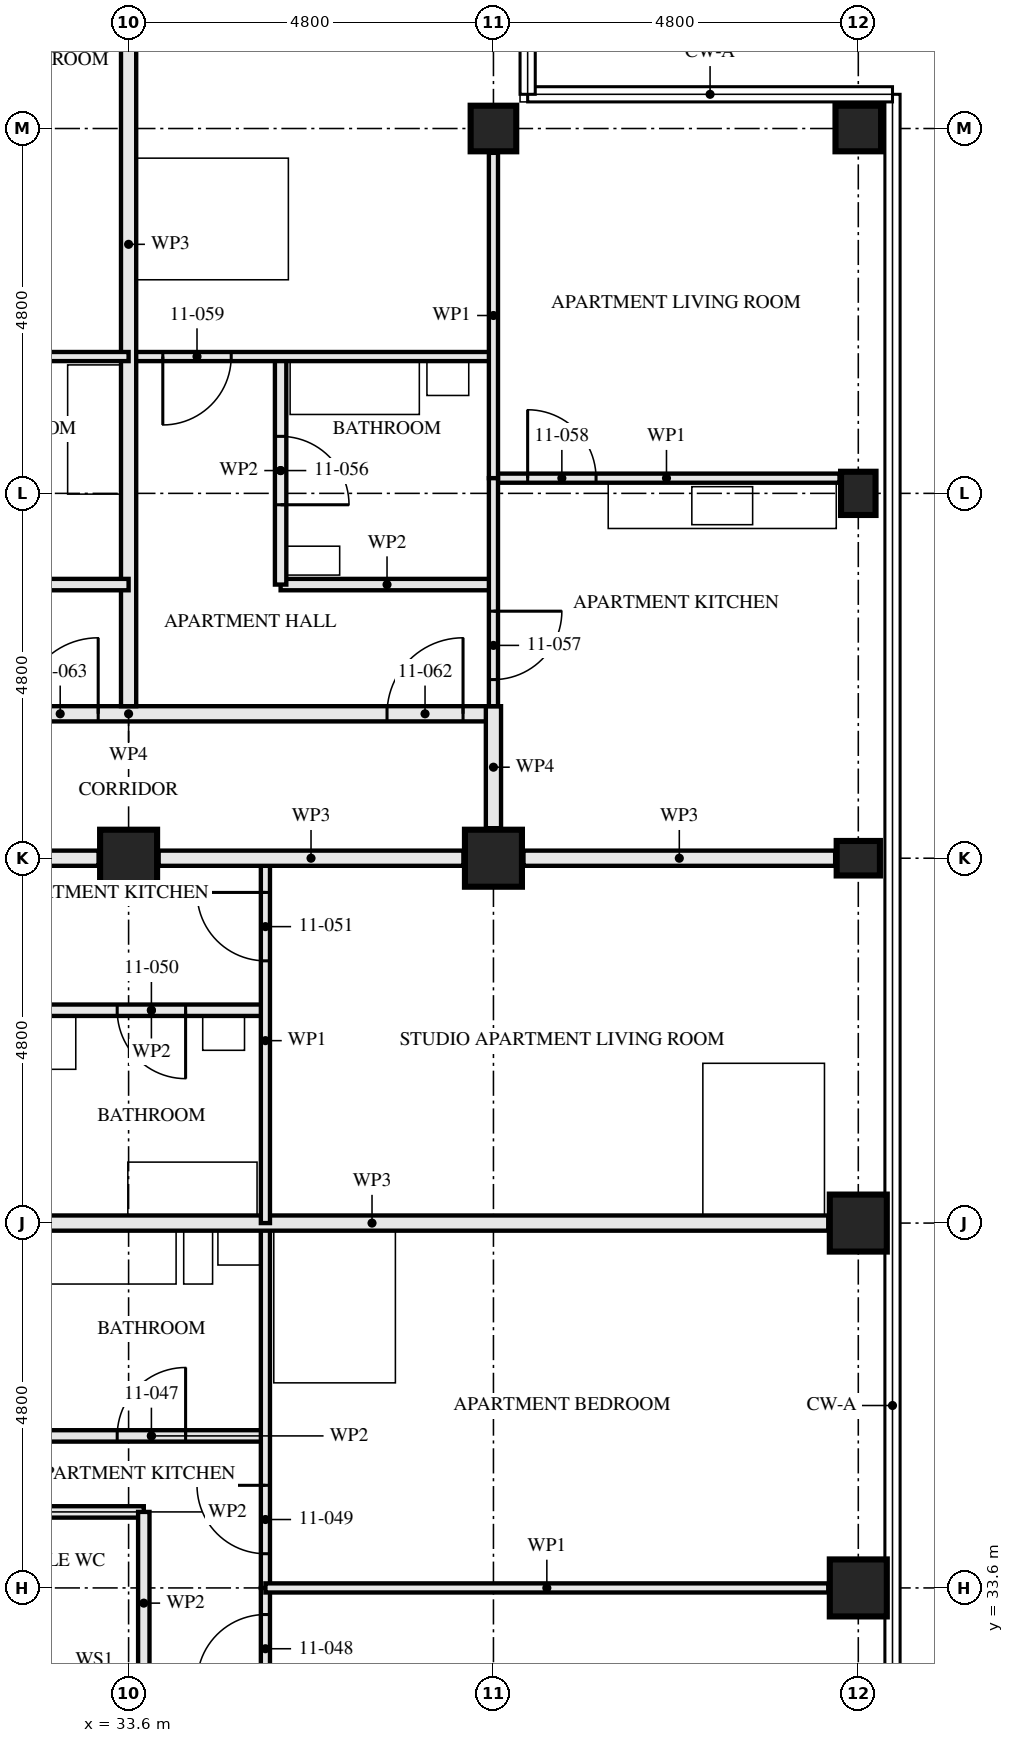
"""IFC4 building model, lengths in metres.
Left out: names, types, materials, properties, quantities, classifications, styles, units other than length and angle.
Written with IfcOpenShell. Run it as: python <this file> out.ifc"""

import sys

from ifc_helpers import new_model, si_unit, direction, frame, frame_2d, origin, origin_2d, place, context, subcontext, project, spatial, rectangle, hollow_rectangle, i_section, extrude, element, fill, save


model = new_model("IFC4")
c1 = context("Model", 3, precision=1e-05, world=origin(), true_north=direction((0.0, 1.0)))
c2 = subcontext(c1, "Body", "Model", "MODEL_VIEW")
j1 = project(units=[si_unit("LENGTHUNIT", "METRE"), si_unit("PLANEANGLEUNIT", "RADIAN")], contexts=[c1])
p1 = place(None, origin())
s1 = spatial("IfcSite", under=j1, at=p1, CompositionType="ELEMENT")
p2 = place(p1, origin())
s2 = spatial("IfcBuilding", under=s1, at=p2, CompositionType="ELEMENT")
p3 = place(p2, frame((0.0, 0.0, 44.5)))
s3 = spatial("IfcBuildingStorey", under=s2, at=p3, CompositionType="ELEMENT", Elevation=44.5)
for number, where, z_axis, x_axis in (
    (1, (33.6, 43.2, 0.0), (0.0, 0.0, 1.0), (0.0, 1.0, 0.0)),
    (2, (38.4, 43.2, 0.0), (0.0, 0.0, 1.0), (0.0, 1.0, 0.0)),
):
    element("IfcColumn", number, at=place(p3, frame(where, z_axis=z_axis, x_axis=x_axis)), inside=s3, PredefinedType="COLUMN", context=c2, shape_type="SweptSolid", body=[
        extrude(hollow_rectangle(XDim=0.75, YDim=0.75, WallThickness=0.08, at=origin_2d()), origin(), (0.0, 0.0, 1.0), 3.5),
    ])
p4 = place(p3, frame((38.4, 52.8, 0.0), z_axis=(0.0, 0.0, 1.0), x_axis=(0.0, 1.0, 0.0)))
e3 = element("IfcColumn", 3, at=p4, inside=s3, PredefinedType="COLUMN", context=c2, shape_type="SweptSolid", body=[
    extrude(hollow_rectangle(XDim=0.6, YDim=0.6, WallThickness=0.05, at=origin_2d()), origin(), (0.0, 0.0, 1.0), 3.5),
])
for number, where, z_axis, x_axis in (
    (4, (43.2, 33.6, 0.0), (0.0, 0.0, 1.0), (1.0, 0.0, 0.0)),
    (5, (43.2, 38.4, 0.0), (0.0, 0.0, 1.0), (1.0, 0.0, 0.0)),
):
    element("IfcColumn", number, at=place(p3, frame(where, z_axis=z_axis, x_axis=x_axis)), inside=s3, PredefinedType="COLUMN", context=c2, shape_type="SweptSolid", body=[
        extrude(hollow_rectangle(XDim=0.75, YDim=0.75, WallThickness=0.08, at=origin_2d()), origin(), (0.0, 0.0, 1.0), 3.5),
    ])
for number, where, z_axis, x_axis in (
    (6, (43.2, 43.2, 0.0), (0.0, 0.0, 1.0), (0.0, 1.0, 0.0)),
    (7, (43.2, 48.0, 0.0), (0.0, 0.0, 1.0), (1.0, 0.0, 0.0)),
):
    element("IfcColumn", number, at=place(p3, frame(where, z_axis=z_axis, x_axis=x_axis)), inside=s3, PredefinedType="COLUMN", context=c2, shape_type="SweptSolid", body=[
        extrude(i_section(OverallWidth=0.454, OverallDepth=0.569, WebThickness=0.078, FlangeThickness=0.125, FilletRadius=0.015, at=origin_2d()), origin(), (0.0, 0.0, 1.0), 3.5),
    ])
p5 = place(p3, frame((43.2, 52.8, 0.0), z_axis=(0.0, 0.0, 1.0), x_axis=(0.0, 1.0, 0.0)))
e8 = element("IfcColumn", 8, at=p5, inside=s3, PredefinedType="COLUMN", context=c2, shape_type="SweptSolid", body=[
    extrude(hollow_rectangle(XDim=0.6, YDim=0.6, WallThickness=0.05, at=origin_2d()), origin(), (0.0, 0.0, 1.0), 3.5),
])
p6 = place(p3, frame((33.8, 32.2, 0.0), z_axis=(0.0, 0.0, 1.0), x_axis=(0.0, 1.0, 0.0)))
e9 = element("IfcWall", 9, at=p6, inside=s3, PredefinedType="PARTITIONING", context=c2, shape_type="SweptSolid", body=[
    extrude(rectangle(XDim=2.4, YDim=0.15, at=frame_2d((1.2, 0.0))), origin(), (0.0, 0.0, 1.0), 2.55),
])
p7 = place(p3, frame((33.8, 34.6, 0.0), z_axis=(0.0, 0.0, 1.0), x_axis=(-1.0, 0.0, 0.0)))
e10 = element("IfcWall", 10, at=p7, inside=s3, PredefinedType="PARTITIONING", context=c2, shape_type="SweptSolid", body=[
    extrude(rectangle(XDim=3.0, YDim=0.15, at=frame_2d((1.5, 0.0))), origin(), (0.0, 0.0, 1.0), 3.33),
])
p8 = place(p3, frame((35.4, 35.6, 0.0), z_axis=(0.0, 0.0, 1.0), x_axis=(-1.0, 0.0, 0.0)))
e11 = element("IfcWall", 11, at=p8, inside=s3, PredefinedType="PARTITIONING", context=c2, shape_type="SweptSolid", body=[
    extrude(rectangle(XDim=3.0, YDim=0.15, at=frame_2d((1.5, 0.0))), origin(), (0.0, 0.0, 1.0), 3.33),
])
p9 = place(p8, frame((1.05, 0.0, 0.0)))
e12 = element("IfcOpeningElement", 12, at=p9, cuts=e11, PredefinedType="OPENING", context=c2, shape_type="SweptSolid", body=[
    extrude(rectangle(XDim=0.9, YDim=2.1, at=frame_2d((0.45, 1.05))), frame((0.0, 0.085, 0.0), z_axis=(0.0, -1.0, 0.0), x_axis=(1.0, 0.0, 0.0)), (0.0, 0.0, 1.0), 0.171),
])
p10 = place(p3, frame((35.4, 32.2, 0.0), z_axis=(0.0, 0.0, 1.0), x_axis=(0.0, 1.0, 0.0)))
e13 = element("IfcWall", 13, at=p10, inside=s3, PredefinedType="PARTITIONING", context=c2, shape_type="SweptSolid", body=[
    extrude(rectangle(XDim=1.4, YDim=0.12, at=frame_2d((0.7, 0.0))), origin(), (0.0, 0.0, 1.0), 3.33),
])
p11 = place(p10, frame((0.15, 0.0, 0.0)))
e14 = element("IfcOpeningElement", 14, at=p11, cuts=e13, PredefinedType="OPENING", context=c2, shape_type="SweptSolid", body=[
    extrude(rectangle(XDim=0.9, YDim=2.1, at=frame_2d((0.45, 1.05))), frame((0.0, 0.071, 0.0), z_axis=(0.0, -1.0, 0.0), x_axis=(1.0, 0.0, 0.0)), (0.0, 0.0, 1.0), 0.141),
])
p12 = place(p3, frame((35.4, 33.6, 0.0), z_axis=(0.0, 0.0, 1.0), x_axis=(0.0, 1.0, 0.0)))
e15 = element("IfcWall", 15, at=p12, inside=s3, PredefinedType="PARTITIONING", context=c2, shape_type="SweptSolid", body=[
    extrude(rectangle(XDim=4.8, YDim=0.12, at=frame_2d((2.4, 0.0))), origin(), (0.0, 0.0, 1.0), 3.33),
])
p13 = place(p12, frame((0.45, 0.0, 0.0)))
e16 = element("IfcOpeningElement", 16, at=p13, cuts=e15, PredefinedType="OPENING", context=c2, shape_type="SweptSolid", body=[
    extrude(rectangle(XDim=0.9, YDim=2.1, at=frame_2d((0.45, 1.05))), frame((0.0, 0.071, 0.0), z_axis=(0.0, -1.0, 0.0), x_axis=(1.0, 0.0, 0.0)), (0.0, 0.0, 1.0), 0.141),
])
p14 = place(p3, frame((42.805, 33.6, 0.0), z_axis=(0.0, 0.0, 1.0), x_axis=(-1.0, 0.0, 0.0)))
e17 = element("IfcWall", 17, at=p14, inside=s3, PredefinedType="PARTITIONING", context=c2, shape_type="SweptSolid", body=[
    extrude(rectangle(XDim=7.405, YDim=0.12, at=frame_2d((3.703, 0.0))), origin(), (0.0, 0.0, 1.0), 2.55),
])
p15 = place(p3, frame((42.805, 38.4, 0.0), z_axis=(0.0, 0.0, 1.0), x_axis=(-1.0, 0.0, 0.0)))
e18 = element("IfcWall", 18, at=p15, inside=s3, PredefinedType="PARTITIONING", context=c2, shape_type="SweptSolid", body=[
    extrude(rectangle(XDim=12.005, YDim=0.2, at=frame_2d((6.002, 0.0))), origin(), (0.0, 0.0, 1.0), 2.55),
])
p16 = place(p3, frame((35.4, 41.2, 0.0), z_axis=(0.0, 0.0, 1.0), x_axis=(-1.0, 0.0, 0.0)))
e19 = element("IfcWall", 19, at=p16, inside=s3, PredefinedType="PARTITIONING", context=c2, shape_type="SweptSolid", body=[
    extrude(rectangle(XDim=3.0, YDim=0.15, at=frame_2d((1.5, 0.0))), origin(), (0.0, 0.0, 1.0), 3.33),
])
p17 = place(p16, frame((1.05, 0.0, 0.0)))
e20 = element("IfcOpeningElement", 20, at=p17, cuts=e19, PredefinedType="OPENING", context=c2, shape_type="SweptSolid", body=[
    extrude(rectangle(XDim=0.9, YDim=2.1, at=frame_2d((0.45, 1.05))), frame((0.0, 0.085, 0.0), z_axis=(0.0, -1.0, 0.0), x_axis=(1.0, 0.0, 0.0)), (0.0, 0.0, 1.0), 0.171),
])
p18 = place(p3, frame((35.4, 38.4, 0.0), z_axis=(0.0, 0.0, 1.0), x_axis=(0.0, 1.0, 0.0)))
e21 = element("IfcWall", 21, at=p18, inside=s3, PredefinedType="PARTITIONING", context=c2, shape_type="SweptSolid", body=[
    extrude(rectangle(XDim=4.8, YDim=0.12, at=frame_2d((2.4, 0.0))), origin(), (0.0, 0.0, 1.0), 3.33),
])
p19 = place(p18, frame((3.45, 0.0, 0.0)))
e22 = element("IfcOpeningElement", 22, at=p19, cuts=e21, PredefinedType="OPENING", context=c2, shape_type="SweptSolid", body=[
    extrude(rectangle(XDim=0.9, YDim=2.1, at=frame_2d((0.45, 1.05))), frame((0.0, 0.071, 0.0), z_axis=(0.0, -1.0, 0.0), x_axis=(1.0, 0.0, 0.0)), (0.0, 0.0, 1.0), 0.141),
])
p20 = place(p3, frame((35.6, 49.8, 0.0), z_axis=(0.0, 0.0, 1.0), x_axis=(0.0, -1.0, 0.0)))
e23 = element("IfcWall", 23, at=p20, inside=s3, PredefinedType="PARTITIONING", context=c2, shape_type="SweptSolid", body=[
    extrude(rectangle(XDim=3.0, YDim=0.15, at=frame_2d((1.5, 0.0))), origin(), (0.0, 0.0, 1.0), 2.55),
])
p21 = place(p20, frame((1.05, 0.0, 0.0)))
e24 = element("IfcOpeningElement", 24, at=p21, cuts=e23, PredefinedType="OPENING", context=c2, shape_type="SweptSolid", body=[
    extrude(rectangle(XDim=0.9, YDim=2.1, at=frame_2d((0.45, 1.05))), frame((0.0, 0.085, 0.0), z_axis=(0.0, -1.0, 0.0), x_axis=(1.0, 0.0, 0.0)), (0.0, 0.0, 1.0), 0.171),
])
p22 = place(p3, frame((38.4, 46.8, 0.0), z_axis=(0.0, 0.0, 1.0), x_axis=(-1.0, 0.0, 0.0)))
e25 = element("IfcWall", 25, at=p22, inside=s3, PredefinedType="PARTITIONING", context=c2, shape_type="SweptSolid", body=[
    extrude(rectangle(XDim=2.8, YDim=0.15, at=frame_2d((1.4, 0.0))), origin(), (0.0, 0.0, 1.0), 3.33),
])
p23 = place(p3, frame((38.4, 48.2, 0.0), z_axis=(0.0, 0.0, 1.0), x_axis=(0.0, -1.0, 0.0)))
e26 = element("IfcWall", 26, at=p23, inside=s3, PredefinedType="PARTITIONING", context=c2, shape_type="SweptSolid", body=[
    extrude(rectangle(XDim=3.0, YDim=0.12, at=frame_2d((1.5, 0.0))), origin(), (0.0, 0.0, 1.0), 2.55),
])
p24 = place(p23, frame((1.75, 0.0, 0.0)))
e27 = element("IfcOpeningElement", 27, at=p24, cuts=e26, PredefinedType="OPENING", context=c2, shape_type="SweptSolid", body=[
    extrude(rectangle(XDim=0.9, YDim=2.1, at=frame_2d((0.45, 1.05))), frame((0.0, 0.071, 0.0), z_axis=(0.0, -1.0, 0.0), x_axis=(1.0, 0.0, 0.0)), (0.0, 0.0, 1.0), 0.141),
])
p25 = place(p3, frame((42.953, 48.2, 0.0), z_axis=(0.0, 0.0, 1.0), x_axis=(-1.0, 0.0, 0.0)))
e28 = element("IfcWall", 28, at=p25, inside=s3, PredefinedType="PARTITIONING", context=c2, shape_type="SweptSolid", body=[
    extrude(rectangle(XDim=4.553, YDim=0.12, at=frame_2d((2.276, 0.0))), origin(), (0.0, 0.0, 1.0), 3.33),
])
p26 = place(p25, frame((3.203, 0.0, 0.0)))
e29 = element("IfcOpeningElement", 29, at=p26, cuts=e28, PredefinedType="OPENING", context=c2, shape_type="SweptSolid", body=[
    extrude(rectangle(XDim=0.9, YDim=2.1, at=frame_2d((0.45, 1.05))), frame((0.0, 0.071, 0.0), z_axis=(0.0, -1.0, 0.0), x_axis=(1.0, 0.0, 0.0)), (0.0, 0.0, 1.0), 0.141),
])
p27 = place(p3, frame((38.4, 49.8, 0.0), z_axis=(0.0, 0.0, 1.0), x_axis=(-1.0, 0.0, 0.0)))
e30 = element("IfcWall", 30, at=p27, inside=s3, PredefinedType="PARTITIONING", context=c2, shape_type="SweptSolid", body=[
    extrude(rectangle(XDim=4.8, YDim=0.12, at=frame_2d((2.4, 0.0))), origin(), (0.0, 0.0, 1.0), 3.33),
])
p28 = place(p27, frame((3.45, 0.0, 0.0)))
e31 = element("IfcOpeningElement", 31, at=p28, cuts=e30, PredefinedType="OPENING", context=c2, shape_type="SweptSolid", body=[
    extrude(rectangle(XDim=0.9, YDim=2.1, at=frame_2d((0.45, 1.05))), frame((0.0, 0.071, 0.0), z_axis=(0.0, -1.0, 0.0), x_axis=(1.0, 0.0, 0.0)), (0.0, 0.0, 1.0), 0.141),
])
p29 = place(p3, frame((38.4, 52.48, 0.0), z_axis=(0.0, 0.0, 1.0), x_axis=(0.0, -1.0, 0.0)))
e32 = element("IfcWall", 32, at=p29, inside=s3, PredefinedType="PARTITIONING", context=c2, shape_type="SweptSolid", body=[
    extrude(rectangle(XDim=4.28, YDim=0.12, at=frame_2d((2.14, 0.0))), origin(), (0.0, 0.0, 1.0), 3.33),
])
p30 = place(p3, frame((33.6, 57.353, 0.0), z_axis=(0.0, 0.0, 1.0), x_axis=(0.0, -1.0, 0.0)))
e33 = element("IfcWall", 33, at=p30, inside=s3, PredefinedType="PARTITIONING", context=c2, shape_type="SweptSolid", body=[
    extrude(rectangle(XDim=12.153, YDim=0.2, at=frame_2d((6.077, 0.0))), origin(), (0.0, 0.0, 1.0), 2.55),
])
p31 = place(p3, frame((33.6, 46.8, 0.0), z_axis=(0.0, 0.0, 1.0), x_axis=(-1.0, 0.0, 0.0)))
e34 = element("IfcWall", 34, at=p31, inside=s3, PredefinedType="PARTITIONING", context=c2, shape_type="SweptSolid", body=[
    extrude(rectangle(XDim=2.8, YDim=0.15, at=frame_2d((1.4, 0.0))), origin(), (0.0, 0.0, 1.0), 3.33),
])
p32 = place(p3, frame((33.6, 49.8, 0.0), z_axis=(0.0, 0.0, 1.0), x_axis=(-1.0, 0.0, 0.0)))
e35 = element("IfcWall", 35, at=p32, inside=s3, PredefinedType="PARTITIONING", context=c2, shape_type="SweptSolid", body=[
    extrude(rectangle(XDim=4.8, YDim=0.12, at=frame_2d((2.4, 0.0))), origin(), (0.0, 0.0, 1.0), 3.33),
])
p33 = place(p32, frame((3.45, 0.0, 0.0)))
e36 = element("IfcOpeningElement", 36, at=p33, cuts=e35, PredefinedType="OPENING", context=c2, shape_type="SweptSolid", body=[
    extrude(rectangle(XDim=0.9, YDim=2.1, at=frame_2d((0.45, 1.05))), frame((0.0, 0.071, 0.0), z_axis=(0.0, -1.0, 0.0), x_axis=(1.0, 0.0, 0.0)), (0.0, 0.0, 1.0), 0.141),
])
p34 = place(p3, frame((38.4, 45.1, 0.0), z_axis=(0.0, 0.0, 1.0), x_axis=(-1.0, 0.0, 0.0)))
e37 = element("IfcWall", 37, at=p34, inside=s3, PredefinedType="PARTITIONING", context=c2, shape_type="SweptSolid", body=[
    extrude(rectangle(XDim=9.6, YDim=0.2, at=frame_2d((4.8, 0.0))), origin(), (0.0, 0.0, 1.0), 3.33),
])
p35 = place(p34, frame((0.4, 0.0, 0.0)))
e38 = element("IfcOpeningElement", 38, at=p35, cuts=e37, PredefinedType="OPENING", context=c2, shape_type="SweptSolid", body=[
    extrude(rectangle(XDim=1.0, YDim=2.1, at=frame_2d((0.5, 1.05))), frame((0.0, 0.111, 0.0), z_axis=(0.0, -1.0, 0.0), x_axis=(1.0, 0.0, 0.0)), (0.0, 0.0, 1.0), 0.221),
])
p36 = place(p34, frame((5.2, 0.0, 0.0)))
e39 = element("IfcOpeningElement", 39, at=p36, cuts=e37, PredefinedType="OPENING", context=c2, shape_type="SweptSolid", body=[
    extrude(rectangle(XDim=1.0, YDim=2.1, at=frame_2d((0.5, 1.05))), frame((0.0, 0.111, 0.0), z_axis=(0.0, -1.0, 0.0), x_axis=(1.0, 0.0, 0.0)), (0.0, 0.0, 1.0), 0.221),
])
p37 = place(p3, frame((38.4, 45.2, 0.0), z_axis=(0.0, 0.0, 1.0), x_axis=(0.0, -1.0, 0.0)))
e40 = element("IfcWall", 40, at=p37, inside=s3, PredefinedType="PARTITIONING", context=c2, shape_type="SweptSolid", body=[
    extrude(rectangle(XDim=1.605, YDim=0.2, at=frame_2d((0.802, 0.0))), origin(), (0.0, 0.0, 1.0), 3.33),
])
p38 = place(p3, frame((42.896, 43.2, 0.0), z_axis=(0.0, 0.0, 1.0), x_axis=(-1.0, 0.0, 0.0)))
e41 = element("IfcWall", 41, at=p38, inside=s3, PredefinedType="PARTITIONING", context=c2, shape_type="SweptSolid", body=[
    extrude(rectangle(XDim=4.101, YDim=0.2, at=frame_2d((2.05, 0.0))), origin(), (0.0, 0.0, 1.0), 2.32),
])
p39 = place(p3, frame((38.005, 43.2, 0.0), z_axis=(0.0, 0.0, 1.0), x_axis=(-1.0, 0.0, 0.0)))
e42 = element("IfcWall", 42, at=p39, inside=s3, PredefinedType="PARTITIONING", context=c2, shape_type="SweptSolid", body=[
    extrude(rectangle(XDim=4.01, YDim=0.2, at=frame_2d((2.005, 0.0))), origin(), (0.0, 0.0, 1.0), 2.32),
])
p40 = place(p3, frame((33.205, 43.2, 0.0), z_axis=(0.0, 0.0, 1.0), x_axis=(-1.0, 0.0, 0.0)))
e43 = element("IfcWall", 43, at=p40, inside=s3, PredefinedType="PARTITIONING", context=c2, shape_type="SweptSolid", body=[
    extrude(rectangle(XDim=2.505, YDim=0.2, at=frame_2d((1.252, 0.0))), origin(), (0.0, 0.0, 1.0), 2.32),
])
p41 = place(p9, frame((0.9, 0.0, 0.0), z_axis=(0.0, 0.0, 1.0), x_axis=(-1.0, 0.0, 0.0)))
e44 = element("IfcDoor", 44, at=p41, inside=s3, OperationType="SINGLE_SWING_LEFT", PredefinedType="DOOR", context=c2, shape_type="SweptSolid", body=[
    extrude(rectangle(XDim=0.9, YDim=2.1, at=frame_2d((0.45, 1.05))), frame((0.0, 0.022, 0.0), z_axis=(0.0, -1.0, 0.0), x_axis=(1.0, 0.0, 0.0)), (0.0, 0.0, 1.0), 0.044),
])
fill(e12, e44)
p42 = place(p11, origin())
e45 = element("IfcDoor", 45, at=p42, inside=s3, OperationType="SINGLE_SWING_RIGHT", PredefinedType="DOOR", context=c2, shape_type="SweptSolid", body=[
    extrude(rectangle(XDim=0.9, YDim=2.1, at=frame_2d((0.45, 1.05))), frame((0.0, 0.022, 0.0), z_axis=(0.0, -1.0, 0.0), x_axis=(1.0, 0.0, 0.0)), (0.0, 0.0, 1.0), 0.044),
])
fill(e14, e45)
p43 = place(p13, origin())
e46 = element("IfcDoor", 46, at=p43, inside=s3, OperationType="SINGLE_SWING_LEFT", PredefinedType="DOOR", context=c2, shape_type="SweptSolid", body=[
    extrude(rectangle(XDim=0.9, YDim=2.1, at=frame_2d((0.45, 1.05))), frame((0.0, 0.022, 0.0), z_axis=(0.0, -1.0, 0.0), x_axis=(1.0, 0.0, 0.0)), (0.0, 0.0, 1.0), 0.044),
])
fill(e16, e46)
p44 = place(p17, origin())
e47 = element("IfcDoor", 47, at=p44, inside=s3, OperationType="SINGLE_SWING_RIGHT", PredefinedType="DOOR", context=c2, shape_type="SweptSolid", body=[
    extrude(rectangle(XDim=0.9, YDim=2.1, at=frame_2d((0.45, 1.05))), frame((0.0, 0.022, 0.0), z_axis=(0.0, -1.0, 0.0), x_axis=(1.0, 0.0, 0.0)), (0.0, 0.0, 1.0), 0.044),
])
fill(e20, e47)
p45 = place(p19, origin())
e48 = element("IfcDoor", 48, at=p45, inside=s3, OperationType="SINGLE_SWING_LEFT", PredefinedType="DOOR", context=c2, shape_type="SweptSolid", body=[
    extrude(rectangle(XDim=0.9, YDim=2.1, at=frame_2d((0.45, 1.05))), frame((0.0, 0.022, 0.0), z_axis=(0.0, -1.0, 0.0), x_axis=(1.0, 0.0, 0.0)), (0.0, 0.0, 1.0), 0.044),
])
fill(e22, e48)
p46 = place(p21, origin())
e49 = element("IfcDoor", 49, at=p46, inside=s3, OperationType="SINGLE_SWING_LEFT", PredefinedType="DOOR", context=c2, shape_type="SweptSolid", body=[
    extrude(rectangle(XDim=0.9, YDim=2.1, at=frame_2d((0.45, 1.05))), frame((0.0, 0.022, 0.0), z_axis=(0.0, -1.0, 0.0), x_axis=(1.0, 0.0, 0.0)), (0.0, 0.0, 1.0), 0.044),
])
fill(e24, e49)
p47 = place(p24, origin())
e50 = element("IfcDoor", 50, at=p47, inside=s3, OperationType="SINGLE_SWING_RIGHT", PredefinedType="DOOR", context=c2, shape_type="SweptSolid", body=[
    extrude(rectangle(XDim=0.9, YDim=2.1, at=frame_2d((0.45, 1.05))), frame((0.0, 0.022, 0.0), z_axis=(0.0, -1.0, 0.0), x_axis=(1.0, 0.0, 0.0)), (0.0, 0.0, 1.0), 0.044),
])
fill(e27, e50)
p48 = place(p26, frame((0.9, 0.0, 0.0), z_axis=(0.0, 0.0, 1.0), x_axis=(-1.0, 0.0, 0.0)))
e51 = element("IfcDoor", 51, at=p48, inside=s3, OperationType="SINGLE_SWING_RIGHT", PredefinedType="DOOR", context=c2, shape_type="SweptSolid", body=[
    extrude(rectangle(XDim=0.9, YDim=2.1, at=frame_2d((0.45, 1.05))), frame((0.0, 0.022, 0.0), z_axis=(0.0, -1.0, 0.0), x_axis=(1.0, 0.0, 0.0)), (0.0, 0.0, 1.0), 0.044),
])
fill(e29, e51)
p49 = place(p28, origin())
e52 = element("IfcDoor", 52, at=p49, inside=s3, OperationType="SINGLE_SWING_LEFT", PredefinedType="DOOR", context=c2, shape_type="SweptSolid", body=[
    extrude(rectangle(XDim=0.9, YDim=2.1, at=frame_2d((0.45, 1.05))), frame((0.0, 0.022, 0.0), z_axis=(0.0, -1.0, 0.0), x_axis=(1.0, 0.0, 0.0)), (0.0, 0.0, 1.0), 0.044),
])
fill(e31, e52)
p50 = place(p35, frame((1.0, 0.0, 0.0), z_axis=(0.0, 0.0, 1.0), x_axis=(-1.0, 0.0, 0.0)))
e53 = element("IfcDoor", 53, at=p50, inside=s3, OperationType="SINGLE_SWING_LEFT", PredefinedType="DOOR", context=c2, shape_type="SweptSolid", body=[
    extrude(rectangle(XDim=1.0, YDim=2.1, at=frame_2d((0.5, 1.05))), frame((0.0, 0.027, 0.0), z_axis=(0.0, -1.0, 0.0), x_axis=(1.0, 0.0, 0.0)), (0.0, 0.0, 1.0), 0.054),
])
fill(e38, e53)
p51 = place(p36, frame((1.0, 0.0, 0.0), z_axis=(0.0, 0.0, 1.0), x_axis=(-1.0, 0.0, 0.0)))
e54 = element("IfcDoor", 54, at=p51, inside=s3, OperationType="SINGLE_SWING_LEFT", PredefinedType="DOOR", context=c2, shape_type="SweptSolid", body=[
    extrude(rectangle(XDim=1.0, YDim=2.1, at=frame_2d((0.5, 1.05))), frame((0.0, 0.027, 0.0), z_axis=(0.0, -1.0, 0.0), x_axis=(1.0, 0.0, 0.0)), (0.0, 0.0, 1.0), 0.054),
])
fill(e39, e54)
save(model, sys.argv[1])
